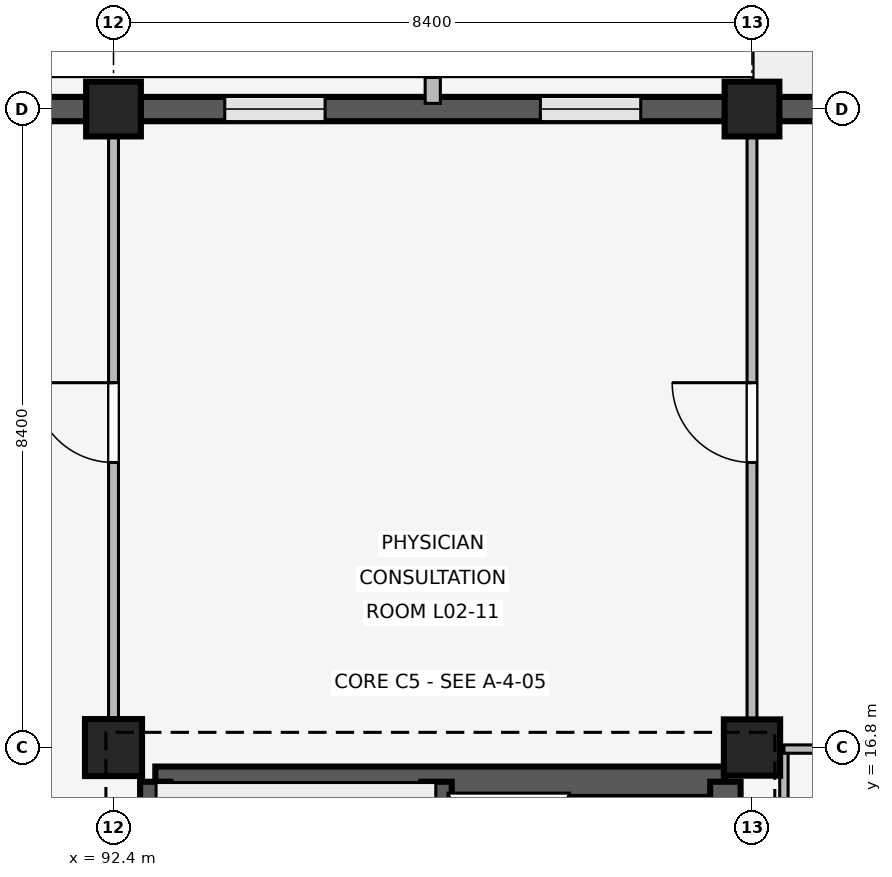
"""IFC4 building model, lengths in metres.
Left out: names, types, materials, properties, quantities, classifications, styles, units other than length and angle.
Written with IfcOpenShell. Run it as: python <this file> out.ifc"""

import sys

from ifc_helpers import new_model, si_unit, direction, frame, frame_2d, origin, origin_2d, place, context, subcontext, project, spatial, rectangle, extrude, element, fill, save


model = new_model("IFC4")
c1 = context("Model", 3, precision=1e-05, world=origin(), true_north=direction((0.0, 1.0)))
c2 = subcontext(c1, "Body", "Model", "MODEL_VIEW")
j1 = project(units=[si_unit("LENGTHUNIT", "METRE"), si_unit("PLANEANGLEUNIT", "RADIAN")], contexts=[c1])
p1 = place(None, origin())
s1 = spatial("IfcSite", under=j1, at=p1, CompositionType="ELEMENT")
p2 = place(p1, origin())
s2 = spatial("IfcBuilding", under=s1, at=p2, CompositionType="ELEMENT")
p3 = place(p2, frame((0.0, 0.0, 8.1)))
s3 = spatial("IfcBuildingStorey", under=s2, at=p3, CompositionType="ELEMENT", Elevation=8.1)
p4 = place(p3, frame((92.4, 16.8, 0.0), z_axis=(0.0, 0.0, 1.0), x_axis=(1.0, 0.0, 0.0)))
e1 = element("IfcColumn", 1, at=p4, inside=s3, PredefinedType="COLUMN", context=c2, shape_type="SweptSolid", body=[
    extrude(rectangle(XDim=0.75, YDim=0.75, at=origin_2d()), origin(), (0.0, 0.0, 1.0), 4.8),
])
p5 = place(p3, frame((92.4, 25.2, 0.0), z_axis=(0.0, 0.0, 1.0), x_axis=(1.0, 0.0, 0.0)))
e2 = element("IfcColumn", 2, at=p5, inside=s3, PredefinedType="COLUMN", context=c2, shape_type="SweptSolid", body=[
    extrude(rectangle(XDim=0.72, YDim=0.72, at=origin_2d()), origin(), (0.0, 0.0, 1.0), 4.8),
])
p6 = place(p3, frame((100.8, 16.8, 0.0), z_axis=(0.0, 0.0, 1.0), x_axis=(1.0, 0.0, 0.0)))
e3 = element("IfcColumn", 3, at=p6, inside=s3, PredefinedType="COLUMN", context=c2, shape_type="SweptSolid", body=[
    extrude(rectangle(XDim=0.74, YDim=0.74, at=origin_2d()), origin(), (0.0, 0.0, 1.0), 4.8),
])
p7 = place(p3, frame((100.8, 25.2, 0.0), z_axis=(0.0, 0.0, 1.0), x_axis=(1.0, 0.0, 0.0)))
e4 = element("IfcColumn", 4, at=p7, inside=s3, PredefinedType="COLUMN", context=c2, shape_type="SweptSolid", body=[
    extrude(rectangle(XDim=0.72, YDim=0.72, at=origin_2d()), origin(), (0.0, 0.0, 1.0), 4.8),
])
p8 = place(p3, frame((84.355, 25.2, 0.0), z_axis=(0.0, 0.0, 1.0), x_axis=(1.0, 0.0, 0.0)))
e5 = element("IfcWall", 5, at=p8, inside=s3, PredefinedType="SOLIDWALL", context=c2, shape_type="SweptSolid", body=[
    extrude(rectangle(XDim=7.69, YDim=0.32, at=frame_2d((3.845, 0.0))), origin(), (0.0, 0.0, 1.0), 3.86),
])
p9 = place(p8, frame((1.049, 0.0, 0.85)))
e6 = element("IfcOpeningElement", 6, at=p9, cuts=e5, PredefinedType="OPENING", context=c2, shape_type="SweptSolid", body=[
    extrude(rectangle(XDim=1.44, YDim=1.62, at=frame_2d((0.72, 0.81))), frame((0.0, 0.17, 0.0), z_axis=(0.0, -1.0, 0.0), x_axis=(1.0, 0.0, 0.0)), (0.0, 0.0, 1.0), 0.34),
])
p10 = place(p8, frame((5.201, 0.0, 0.85)))
e7 = element("IfcOpeningElement", 7, at=p10, cuts=e5, PredefinedType="OPENING", context=c2, shape_type="SweptSolid", body=[
    extrude(rectangle(XDim=1.44, YDim=1.62, at=frame_2d((0.72, 0.81))), frame((0.0, 0.17, 0.0), z_axis=(0.0, -1.0, 0.0), x_axis=(1.0, 0.0, 0.0)), (0.0, 0.0, 1.0), 0.34),
])
p11 = place(p3, frame((92.755, 25.2, 0.0), z_axis=(0.0, 0.0, 1.0), x_axis=(1.0, 0.0, 0.0)))
e8 = element("IfcWall", 8, at=p11, inside=s3, PredefinedType="SOLIDWALL", context=c2, shape_type="SweptSolid", body=[
    extrude(rectangle(XDim=7.69, YDim=0.32, at=frame_2d((3.845, 0.0))), origin(), (0.0, 0.0, 1.0), 3.86),
])
p12 = place(p11, frame((1.109, 0.0, 0.85)))
e9 = element("IfcOpeningElement", 9, at=p12, cuts=e8, PredefinedType="OPENING", context=c2, shape_type="SweptSolid", body=[
    extrude(rectangle(XDim=1.32, YDim=1.58, at=frame_2d((0.66, 0.79))), frame((0.0, 0.17, 0.0), z_axis=(0.0, -1.0, 0.0), x_axis=(1.0, 0.0, 0.0)), (0.0, 0.0, 1.0), 0.34),
])
p13 = place(p11, frame((5.261, 0.0, 0.85)))
e10 = element("IfcOpeningElement", 10, at=p13, cuts=e8, PredefinedType="OPENING", context=c2, shape_type="SweptSolid", body=[
    extrude(rectangle(XDim=1.32, YDim=1.58, at=frame_2d((0.66, 0.79))), frame((0.0, 0.17, 0.0), z_axis=(0.0, -1.0, 0.0), x_axis=(1.0, 0.0, 0.0)), (0.0, 0.0, 1.0), 0.34),
])
p14 = place(p3, frame((96.6, 25.275, 0.0), z_axis=(0.0, 0.0, 1.0), x_axis=(0.0, 1.0, 0.0)))
e11 = element("IfcWall", 11, at=p14, inside=s3, PredefinedType="ELEMENTEDWALL", context=c2, shape_type="SweptSolid", body=[
    extrude(rectangle(XDim=0.34, YDim=0.2, at=frame_2d((0.17, 0.0))), origin(), (0.0, 0.0, 1.0), 3.84),
])
p15 = place(p3, frame((101.155, 25.2, 0.0), z_axis=(0.0, 0.0, 1.0), x_axis=(1.0, 0.0, 0.0)))
e12 = element("IfcWall", 12, at=p15, inside=s3, PredefinedType="SOLIDWALL", context=c2, shape_type="SweptSolid", body=[
    extrude(rectangle(XDim=7.69, YDim=0.32, at=frame_2d((3.845, 0.0))), origin(), (0.0, 0.0, 1.0), 3.86),
])
p16 = place(p15, frame((1.139, 0.0, 0.85)))
e13 = element("IfcOpeningElement", 13, at=p16, cuts=e12, PredefinedType="OPENING", context=c2, shape_type="SweptSolid", body=[
    extrude(rectangle(XDim=1.26, YDim=1.52, at=frame_2d((0.63, 0.76))), frame((0.0, 0.17, 0.0), z_axis=(0.0, -1.0, 0.0), x_axis=(1.0, 0.0, 0.0)), (0.0, 0.0, 1.0), 0.34),
])
p17 = place(p15, frame((5.291, 0.0, 0.85)))
e14 = element("IfcOpeningElement", 14, at=p17, cuts=e12, PredefinedType="OPENING", context=c2, shape_type="SweptSolid", body=[
    extrude(rectangle(XDim=1.26, YDim=1.52, at=frame_2d((0.63, 0.76))), frame((0.0, 0.17, 0.0), z_axis=(0.0, -1.0, 0.0), x_axis=(1.0, 0.0, 0.0)), (0.0, 0.0, 1.0), 0.34),
])
p18 = place(p3, frame((92.95, 16.35, 0.0), z_axis=(0.0, 0.0, 1.0), x_axis=(1.0, 0.0, 0.0)))
e15 = element("IfcWall", 15, at=p18, inside=s3, PredefinedType="SHEAR", context=c2, shape_type="SweptSolid", body=[
    extrude(rectangle(XDim=7.5, YDim=0.4, at=frame_2d((3.75, 0.0))), origin(), (0.0, 0.0, 1.0), 4.52),
])
p19 = place(p3, frame((92.95, 8.8, 0.0), z_axis=(0.0, 0.0, 1.0), x_axis=(0.0, 1.0, 0.0)))
e16 = element("IfcWall", 16, at=p19, inside=s3, PredefinedType="SHEAR", context=c2, shape_type="SweptSolid", body=[
    extrude(rectangle(XDim=7.55, YDim=0.4, at=frame_2d((3.775, 0.0))), origin(), (0.0, 0.0, 1.0), 4.52),
])
p20 = place(p19, frame((0.28, 0.0, 0.0)))
e17 = element("IfcOpeningElement", 17, at=p20, cuts=e16, PredefinedType="OPENING", context=c2, shape_type="SweptSolid", body=[
    extrude(rectangle(XDim=1.0, YDim=2.15, at=frame_2d((0.5, 1.075))), frame((0.0, 0.21, 0.0), z_axis=(0.0, -1.0, 0.0), x_axis=(1.0, 0.0, 0.0)), (0.0, 0.0, 1.0), 0.42),
])
p21 = place(p3, frame((100.45, 8.8, 0.0), z_axis=(0.0, 0.0, 1.0), x_axis=(0.0, 1.0, 0.0)))
e18 = element("IfcWall", 18, at=p21, inside=s3, PredefinedType="SHEAR", context=c2, shape_type="SweptSolid", body=[
    extrude(rectangle(XDim=7.55, YDim=0.4, at=frame_2d((3.775, 0.0))), origin(), (0.0, 0.0, 1.0), 4.52),
])
p22 = place(p21, frame((2.4, 0.0, 0.0)))
e19 = element("IfcOpeningElement", 19, at=p22, cuts=e18, PredefinedType="OPENING", context=c2, shape_type="SweptSolid", body=[
    extrude(rectangle(XDim=1.2, YDim=2.2, at=frame_2d((0.6, 1.1))), frame((0.0, 0.21, 0.0), z_axis=(0.0, -1.0, 0.0), x_axis=(1.0, 0.0, 0.0)), (0.0, 0.0, 1.0), 0.42),
])
p23 = place(p3, frame((96.65, 8.8, 0.0), z_axis=(0.0, 0.0, 1.0), x_axis=(0.0, 1.0, 0.0)))
e20 = element("IfcWall", 20, at=p23, inside=s3, PredefinedType="SHEAR", context=c2, shape_type="SweptSolid", body=[
    extrude(rectangle(XDim=7.55, YDim=0.4, at=frame_2d((3.775, 0.0))), origin(), (0.0, 0.0, 1.0), 4.52),
])
p24 = place(p23, frame((0.28, 0.0, 0.0)))
e21 = element("IfcOpeningElement", 21, at=p24, cuts=e20, PredefinedType="OPENING", context=c2, shape_type="SweptSolid", body=[
    extrude(rectangle(XDim=1.0, YDim=2.15, at=frame_2d((0.5, 1.075))), frame((0.0, 0.21, 0.0), z_axis=(0.0, -1.0, 0.0), x_axis=(1.0, 0.0, 0.0)), (0.0, 0.0, 1.0), 0.42),
])
p25 = place(p3, frame((92.4, 17.15, 0.0), z_axis=(0.0, 0.0, 1.0), x_axis=(0.0, 1.0, 0.0)))
e22 = element("IfcWall", 22, at=p25, inside=s3, PredefinedType="PARTITIONING", context=c2, shape_type="SweptSolid", body=[
    extrude(rectangle(XDim=7.91, YDim=0.13, at=frame_2d((3.955, 0.0))), origin(), (0.0, 0.0, 1.0), 3.84),
])
p26 = place(p25, frame((3.4, 0.0, 0.0)))
e23 = element("IfcOpeningElement", 23, at=p26, cuts=e22, PredefinedType="OPENING", context=c2, shape_type="SweptSolid", body=[
    extrude(rectangle(XDim=1.05, YDim=2.2, at=frame_2d((0.525, 1.1))), frame((0.0, 0.075, 0.0), z_axis=(0.0, -1.0, 0.0), x_axis=(1.0, 0.0, 0.0)), (0.0, 0.0, 1.0), 0.15),
])
p27 = place(p3, frame((100.8, 17.15, 0.0), z_axis=(0.0, 0.0, 1.0), x_axis=(0.0, 1.0, 0.0)))
e24 = element("IfcWall", 24, at=p27, inside=s3, PredefinedType="PARTITIONING", context=c2, shape_type="SweptSolid", body=[
    extrude(rectangle(XDim=7.91, YDim=0.13, at=frame_2d((3.955, 0.0))), origin(), (0.0, 0.0, 1.0), 3.84),
])
p28 = place(p27, frame((3.4, 0.0, 0.0)))
e25 = element("IfcOpeningElement", 25, at=p28, cuts=e24, PredefinedType="OPENING", context=c2, shape_type="SweptSolid", body=[
    extrude(rectangle(XDim=1.05, YDim=2.2, at=frame_2d((0.525, 1.1))), frame((0.0, 0.075, 0.0), z_axis=(0.0, -1.0, 0.0), x_axis=(1.0, 0.0, 0.0)), (0.0, 0.0, 1.0), 0.15),
])
p29 = place(p3, frame((101.22, 14.17, 0.0), z_axis=(0.0, 0.0, 1.0), x_axis=(0.0, 1.0, 0.0)))
e26 = element("IfcWall", 26, at=p29, inside=s3, PredefinedType="PARTITIONING", context=c2, shape_type="SweptSolid", body=[
    extrude(rectangle(XDim=2.61, YDim=0.11, at=frame_2d((1.305, 0.0))), origin(), (0.0, 0.0, 1.0), 3.84),
])
p30 = place(p3, frame((101.22, 16.78, 0.0), z_axis=(0.0, 0.0, 1.0), x_axis=(1.0, 0.0, 0.0)))
e27 = element("IfcWall", 27, at=p30, inside=s3, PredefinedType="PARTITIONING", context=c2, shape_type="SweptSolid", body=[
    extrude(rectangle(XDim=1.98, YDim=0.11, at=frame_2d((0.99, 0.0))), origin(), (0.0, 0.0, 1.0), 3.84),
])
p31 = place(p30, frame((0.54, 0.0, 0.0)))
e28 = element("IfcOpeningElement", 28, at=p31, cuts=e27, PredefinedType="OPENING", context=c2, shape_type="SweptSolid", body=[
    extrude(rectangle(XDim=0.9, YDim=2.1, at=frame_2d((0.45, 1.05))), frame((0.0, 0.065, 0.0), z_axis=(0.0, -1.0, 0.0), x_axis=(1.0, 0.0, 0.0)), (0.0, 0.0, 1.0), 0.13),
])
p32 = place(p12, origin())
e29 = element("IfcWindow", 29, at=p32, inside=s3, PartitioningType="SINGLE_PANEL", PredefinedType="WINDOW", context=c2, shape_type="SweptSolid", body=[
    extrude(rectangle(XDim=1.32, YDim=1.58, at=frame_2d((0.66, 0.79))), frame((0.0, 0.03, 0.0), z_axis=(0.0, -1.0, 0.0), x_axis=(1.0, 0.0, 0.0)), (0.0, 0.0, 1.0), 0.06),
])
fill(e9, e29)
p33 = place(p13, origin())
e30 = element("IfcWindow", 30, at=p33, inside=s3, PartitioningType="SINGLE_PANEL", PredefinedType="WINDOW", context=c2, shape_type="SweptSolid", body=[
    extrude(rectangle(XDim=1.32, YDim=1.58, at=frame_2d((0.66, 0.79))), frame((0.0, 0.03, 0.0), z_axis=(0.0, -1.0, 0.0), x_axis=(1.0, 0.0, 0.0)), (0.0, 0.0, 1.0), 0.06),
])
fill(e10, e30)
p34 = place(p26, origin())
e31 = element("IfcDoor", 31, at=p34, inside=s3, OperationType="SINGLE_SWING_RIGHT", PredefinedType="DOOR", context=c2, shape_type="SweptSolid", body=[
    extrude(rectangle(XDim=1.05, YDim=2.2, at=frame_2d((0.525, 1.1))), frame((0.0, 0.025, 0.0), z_axis=(0.0, -1.0, 0.0), x_axis=(1.0, 0.0, 0.0)), (0.0, 0.0, 1.0), 0.05),
])
fill(e23, e31)
p35 = place(p28, origin())
e32 = element("IfcDoor", 32, at=p35, inside=s3, OperationType="SINGLE_SWING_RIGHT", PredefinedType="DOOR", context=c2, shape_type="SweptSolid", body=[
    extrude(rectangle(XDim=1.05, YDim=2.2, at=frame_2d((0.525, 1.1))), frame((0.0, 0.025, 0.0), z_axis=(0.0, -1.0, 0.0), x_axis=(1.0, 0.0, 0.0)), (0.0, 0.0, 1.0), 0.05),
])
fill(e25, e32)
save(model, sys.argv[1])
